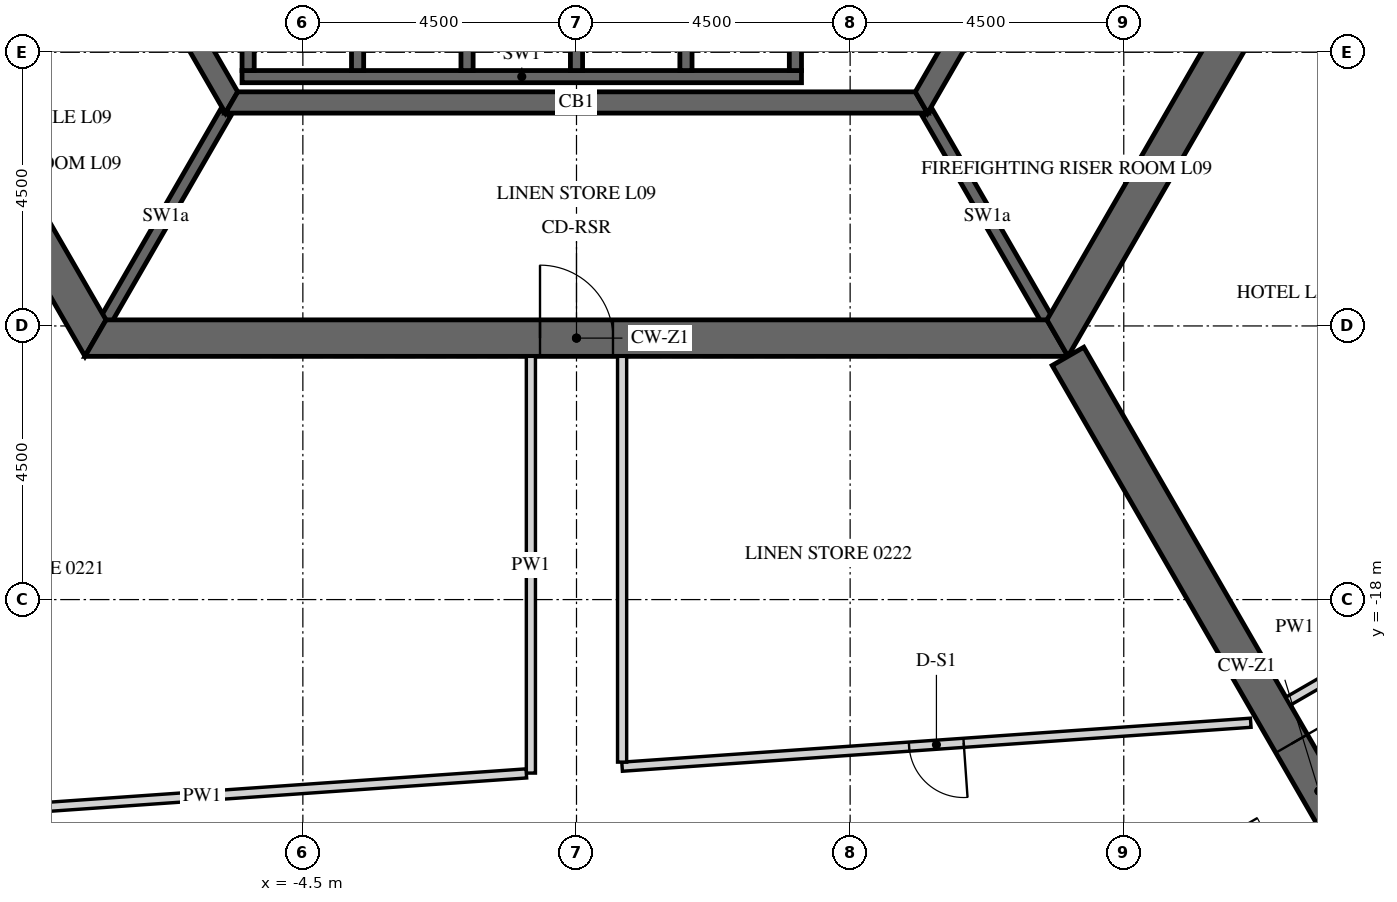
"""IFC4 building model, lengths in metres.
Left out: names, types, materials, properties, quantities, classifications, styles, units other than length and angle.
Written with IfcOpenShell. Run it as: python <this file> out.ifc"""

import sys

from ifc_helpers import new_model, si_unit, direction, frame, frame_2d, origin, place, context, subcontext, project, spatial, polyline, rectangle, outline, extrude, element, fill, save


model = new_model("IFC4")
c1 = context("Model", 3, precision=1e-05, world=origin(), true_north=direction((0.0, 1.0)))
c2 = subcontext(c1, "Body", "Model", "MODEL_VIEW")
j1 = project(units=[si_unit("LENGTHUNIT", "METRE"), si_unit("PLANEANGLEUNIT", "RADIAN")], contexts=[c1])
p1 = place(None, origin())
s1 = spatial("IfcSite", under=j1, at=p1, CompositionType="ELEMENT")
p2 = place(p1, origin())
s2 = spatial("IfcBuilding", under=s1, at=p2, CompositionType="ELEMENT")
p3 = place(p2, frame((0.0, 0.0, 49.2)))
s3 = spatial("IfcBuildingStorey", under=s2, at=p3, CompositionType="ELEMENT", Elevation=49.2)
p4 = place(p3, frame((-15.819, 0.0, -0.15), z_axis=(0.0, 0.0, 1.0), x_axis=(0.499999880136, -0.866025472988, 0.0)))
e1 = element("IfcWall", 1, at=p4, inside=s3, PredefinedType="SHEAR", context=c2, shape_type="SweptSolid", body=[
    extrude(outline(polyline([(-0.173, -0.3), (15.993, -0.3), (15.646, 0.3), (0.173, 0.3), (-0.173, -0.3)])), origin(), (0.0, 0.0, 1.0), 3.9),
])
p5 = place(p4, frame((6.981, 0.0, 0.15)))
e2 = element("IfcOpeningElement", 2, at=p5, cuts=e1, PredefinedType="OPENING", context=c2, shape_type="SweptSolid", body=[
    extrude(rectangle(XDim=1.8, YDim=2.4, at=frame_2d((0.9, 1.2))), frame((0.0, 0.31, 0.0), z_axis=(0.0, -1.0, 0.0), x_axis=(1.0, 0.0, 0.0)), (0.0, 0.0, 1.0), 0.62),
])
p6 = place(p3, frame((-7.91, -13.7, -0.15), z_axis=(0.0, 0.0, 1.0), x_axis=(1.0, 0.0, 0.0)))
e3 = element("IfcWall", 3, at=p6, inside=s3, PredefinedType="SHEAR", context=c2, shape_type="SweptSolid", body=[
    extrude(outline(polyline([(-0.173, -0.3), (15.993, -0.3), (15.646, 0.3), (0.173, 0.3), (-0.173, -0.3)])), origin(), (0.0, 0.0, 1.0), 3.9),
])
p7 = place(p6, frame((7.31, 0.0, 0.15)))
e4 = element("IfcOpeningElement", 4, at=p7, cuts=e3, PredefinedType="OPENING", context=c2, shape_type="SweptSolid", body=[
    extrude(rectangle(XDim=1.2, YDim=2.4, at=frame_2d((0.6, 1.2))), frame((0.0, 0.31, 0.0), z_axis=(0.0, -1.0, 0.0), x_axis=(1.0, 0.0, 0.0)), (0.0, 0.0, 1.0), 0.62),
])
p8 = place(p3, frame((7.91, -13.7, -0.15), z_axis=(0.0, 0.0, 1.0), x_axis=(0.499999880136, 0.866025472988, 0.0)))
e5 = element("IfcWall", 5, at=p8, inside=s3, PredefinedType="SHEAR", context=c2, shape_type="SweptSolid", body=[
    extrude(outline(polyline([(-0.173, -0.3), (15.993, -0.3), (15.646, 0.3), (0.173, 0.3), (-0.173, -0.3)])), origin(), (0.0, 0.0, 1.0), 3.9),
])
p9 = place(p8, frame((7.039, 0.0, 0.15)))
e6 = element("IfcOpeningElement", 6, at=p9, cuts=e5, PredefinedType="OPENING", context=c2, shape_type="SweptSolid", body=[
    extrude(rectangle(XDim=1.8, YDim=2.4, at=frame_2d((0.9, 1.2))), frame((0.0, 0.31, 0.0), z_axis=(0.0, -1.0, 0.0), x_axis=(1.0, 0.0, 0.0)), (0.0, 0.0, 1.0), 0.62),
])
p10 = place(p3, frame((8.083, -14.0, -0.15), z_axis=(0.0, 0.0, 1.0), x_axis=(0.499997680643, -0.866026742862, 0.0)))
e7 = element("IfcWall", 7, at=p10, inside=s3, PredefinedType="SHEAR", context=c2, shape_type="SweptSolid", body=[
    extrude(rectangle(XDim=16.509, YDim=0.6, at=frame_2d((8.254, 0.0))), origin(), (0.0, 0.0, 1.0), 3.9),
])
p11 = place(p10, frame((7.354, 0.0, 0.15)))
e8 = element("IfcOpeningElement", 8, at=p11, cuts=e7, PredefinedType="OPENING", context=c2, shape_type="SweptSolid", body=[
    extrude(rectangle(XDim=1.8, YDim=2.4, at=frame_2d((0.9, 1.2))), frame((0.0, 0.31, 0.0), z_axis=(0.0, -1.0, 0.0), x_axis=(1.0, 0.0, 0.0)), (0.0, 0.0, 1.0), 0.62),
])
p12 = place(p3, frame((-11.345, 0.0, -0.15), z_axis=(0.0, 0.0, 1.0), x_axis=(0.499995046907, -0.866028263435, 0.0)))
e9 = element("IfcWall", 9, at=p12, inside=s3, PredefinedType="SHEAR", context=c2, shape_type="SweptSolid", body=[
    extrude(outline(polyline([(-0.101, -0.175), (11.446, -0.175), (11.244, 0.175), (0.101, 0.175), (-0.101, -0.175)])), origin(), (0.0, 0.0, 1.0), 3.9),
])
p13 = place(p12, frame((4.744, 0.0, 0.15)))
e10 = element("IfcOpeningElement", 10, at=p13, cuts=e9, PredefinedType="OPENING", context=c2, shape_type="SweptSolid", body=[
    extrude(rectangle(XDim=1.8, YDim=2.4, at=frame_2d((0.9, 1.2))), frame((0.0, 0.185, 0.0), z_axis=(0.0, -1.0, 0.0), x_axis=(1.0, 0.0, 0.0)), (0.0, 0.0, 1.0), 0.37),
])
p14 = place(p3, frame((-5.673, -9.825, -0.15), z_axis=(0.0, 0.0, 1.0), x_axis=(1.0, 0.0, 0.0)))
e11 = element("IfcWall", 11, at=p14, inside=s3, PredefinedType="SHEAR", context=c2, shape_type="SweptSolid", body=[
    extrude(outline(polyline([(-0.101, -0.175), (11.446, -0.175), (11.244, 0.175), (0.101, 0.175), (-0.101, -0.175)])), origin(), (0.0, 0.0, 1.0), 3.9),
])
p15 = place(p3, frame((5.673, -9.825, -0.15), z_axis=(0.0, 0.0, 1.0), x_axis=(0.499995046907, 0.866028263435, 0.0)))
e12 = element("IfcWall", 12, at=p15, inside=s3, PredefinedType="SHEAR", context=c2, shape_type="SweptSolid", body=[
    extrude(outline(polyline([(-0.101, -0.175), (11.446, -0.175), (11.244, 0.175), (0.101, 0.175), (-0.101, -0.175)])), origin(), (0.0, 0.0, 1.0), 3.9),
])
p16 = place(p15, frame((4.801, 0.0, 0.15)))
e13 = element("IfcOpeningElement", 13, at=p16, cuts=e12, PredefinedType="OPENING", context=c2, shape_type="SweptSolid", body=[
    extrude(rectangle(XDim=1.8, YDim=2.4, at=frame_2d((0.9, 1.2))), frame((0.0, 0.185, 0.0), z_axis=(0.0, -1.0, 0.0), x_axis=(1.0, 0.0, 0.0)), (0.0, 0.0, 1.0), 0.37),
])
p17 = place(p3, frame((-5.5, -9.4, -0.25), z_axis=(0.0, 0.0, 1.0), x_axis=(1.0, 0.0, 0.0)))
e14 = element("IfcWall", 14, at=p17, inside=s3, PredefinedType="SHEAR", context=c2, shape_type="SweptSolid", body=[
    extrude(rectangle(XDim=9.2, YDim=0.2, at=frame_2d((4.6, 0.0))), origin(), (0.0, 0.0, 1.0), 3.9),
])
for number, where, z_axis, x_axis in (
    (15, (-5.4, -9.3, -0.25), (0.0, 0.0, 1.0), (0.0, 1.0, 0.0)),
    (16, (-3.6, -9.3, -0.25), (0.0, 0.0, 1.0), (0.0, 1.0, 0.0)),
    (17, (-1.8, -9.3, -0.25), (0.0, 0.0, 1.0), (0.0, 1.0, 0.0)),
    (18, (0.0, -9.3, -0.25), (0.0, 0.0, 1.0), (0.0, 1.0, 0.0)),
    (19, (1.8, -9.3, -0.25), (0.0, 0.0, 1.0), (0.0, 1.0, 0.0)),
    (20, (3.6, -9.3, -0.25), (0.0, 0.0, 1.0), (0.0, 1.0, 0.0)),
):
    element("IfcWall", number, at=place(p3, frame(where, z_axis=z_axis, x_axis=x_axis)), inside=s3, PredefinedType="SHEAR", context=c2, shape_type="SweptSolid", body=[
        extrude(rectangle(XDim=2.9, YDim=0.2, at=frame_2d((1.45, 0.0))), origin(), (0.0, 0.0, 1.0), 3.9),
    ])
for number, where, z_axis, x_axis in (
    (21, (-5.773, -10.0, -0.15), (0.0, 0.0, 1.0), (-0.5, -0.866, 0.0)),
    (22, (5.773, -10.0, -0.15), (0.0, 0.0, 1.0), (0.5, -0.866, 0.0)),
):
    element("IfcWall", number, at=place(p3, frame(where, z_axis=z_axis, x_axis=x_axis)), inside=s3, PredefinedType="SHEAR", context=c2, shape_type="SweptSolid", body=[
        extrude(rectangle(XDim=3.926, YDim=0.2, at=frame_2d((1.963, 0.0))), origin(), (0.0, 0.0, 1.0), 3.9),
    ])
p18 = place(p3, frame((-0.75, -14.0, 0.0), z_axis=(0.0, 0.0, 1.0), x_axis=(0.0, -1.0, 0.0)))
e23 = element("IfcWall", 23, at=p18, inside=s3, PredefinedType="PARTITIONING", context=c2, shape_type="SweptSolid", body=[
    extrude(rectangle(XDim=6.853, YDim=0.15, at=frame_2d((3.427, 0.0))), origin(), (0.0, 0.0, 1.0), 2.988),
])
p19 = place(p3, frame((-0.825, -20.858, 0.0), z_axis=(0.0, 0.0, 1.0), x_axis=(-0.997563801863, -0.069760025895, 0.0)))
e24 = element("IfcWall", 24, at=p19, inside=s3, PredefinedType="PARTITIONING", context=c2, shape_type="SweptSolid", body=[
    extrude(rectangle(XDim=10.688, YDim=0.15, at=frame_2d((5.344, 0.0))), origin(), (0.0, 0.0, 1.0), 2.988),
])
p20 = place(p3, frame((11.088, -20.025, 0.0), z_axis=(0.0, 0.0, 1.0), x_axis=(-0.997564133621, -0.069755281607, 0.0)))
e25 = element("IfcWall", 25, at=p20, inside=s3, PredefinedType="PARTITIONING", context=c2, shape_type="SweptSolid", body=[
    extrude(rectangle(XDim=10.363, YDim=0.15, at=frame_2d((5.182, 0.0))), origin(), (0.0, 0.0, 1.0), 2.988),
])
p21 = place(p20, frame((4.732, 0.0, 0.0)))
e26 = element("IfcOpeningElement", 26, at=p21, cuts=e25, PredefinedType="OPENING", context=c2, shape_type="SweptSolid", body=[
    extrude(rectangle(XDim=0.9, YDim=2.1, at=frame_2d((0.45, 1.05))), frame((0.0, 0.085, 0.0), z_axis=(0.0, -1.0, 0.0), x_axis=(1.0, 0.0, 0.0)), (0.0, 0.0, 1.0), 0.17),
])
p22 = place(p3, frame((0.75, -20.673, 0.0), z_axis=(0.0, 0.0, 1.0), x_axis=(0.0, 1.0, 0.0)))
e27 = element("IfcWall", 27, at=p22, inside=s3, PredefinedType="PARTITIONING", context=c2, shape_type="SweptSolid", body=[
    extrude(rectangle(XDim=6.673, YDim=0.15, at=frame_2d((3.336, 0.0))), origin(), (0.0, 0.0, 1.0), 2.988),
])
p23 = place(p3, frame((11.614, -7.884, 0.0), z_axis=(0.0, 0.0, 1.0), x_axis=(0.866026575979, -0.499997969693, 0.0)))
e28 = element("IfcWall", 28, at=p23, inside=s3, PredefinedType="PARTITIONING", context=c2, shape_type="SweptSolid", body=[
    extrude(rectangle(XDim=6.75, YDim=0.15, at=frame_2d((3.375, 0.0))), origin(), (0.0, 0.0, 1.0), 2.988),
])
p24 = place(p3, frame((12.924, -18.966, 0.0), z_axis=(0.0, 0.0, 1.0), x_axis=(-0.866038455972, -0.499977392266, 0.0)))
e29 = element("IfcWall", 29, at=p24, inside=s3, PredefinedType="PARTITIONING", context=c2, shape_type="SweptSolid", body=[
    extrude(rectangle(XDim=1.409, YDim=0.15, at=frame_2d((0.705, 0.0))), origin(), (0.0, 0.0, 1.0), 2.988),
])
p25 = place(p7, origin())
e30 = element("IfcDoor", 30, at=p25, inside=s3, OperationType="SINGLE_SWING_LEFT", PredefinedType="DOOR", context=c2, shape_type="SweptSolid", body=[
    extrude(rectangle(XDim=1.2, YDim=2.4, at=frame_2d((0.6, 1.2))), frame((0.0, 0.025, 0.0), z_axis=(0.0, -1.0, 0.0), x_axis=(1.0, 0.0, 0.0)), (0.0, 0.0, 1.0), 0.05),
])
fill(e4, e30)
p26 = place(p11, origin())
e31 = element("IfcDoor", 31, at=p26, inside=s3, OperationType="DOUBLE_DOOR_SINGLE_SWING", PredefinedType="DOOR", context=c2, shape_type="SweptSolid", body=[
    extrude(rectangle(XDim=1.8, YDim=2.4, at=frame_2d((0.9, 1.2))), frame((0.0, 0.025, 0.0), z_axis=(0.0, -1.0, 0.0), x_axis=(1.0, 0.0, 0.0)), (0.0, 0.0, 1.0), 0.05),
])
fill(e8, e31)
p27 = place(p21, origin())
e32 = element("IfcDoor", 32, at=p27, inside=s3, OperationType="SINGLE_SWING_LEFT", PredefinedType="DOOR", context=c2, shape_type="SweptSolid", body=[
    extrude(rectangle(XDim=0.9, YDim=2.1, at=frame_2d((0.45, 1.05))), frame((0.0, 0.025, 0.0), z_axis=(0.0, -1.0, 0.0), x_axis=(1.0, 0.0, 0.0)), (0.0, 0.0, 1.0), 0.05),
])
fill(e26, e32)
save(model, sys.argv[1])
